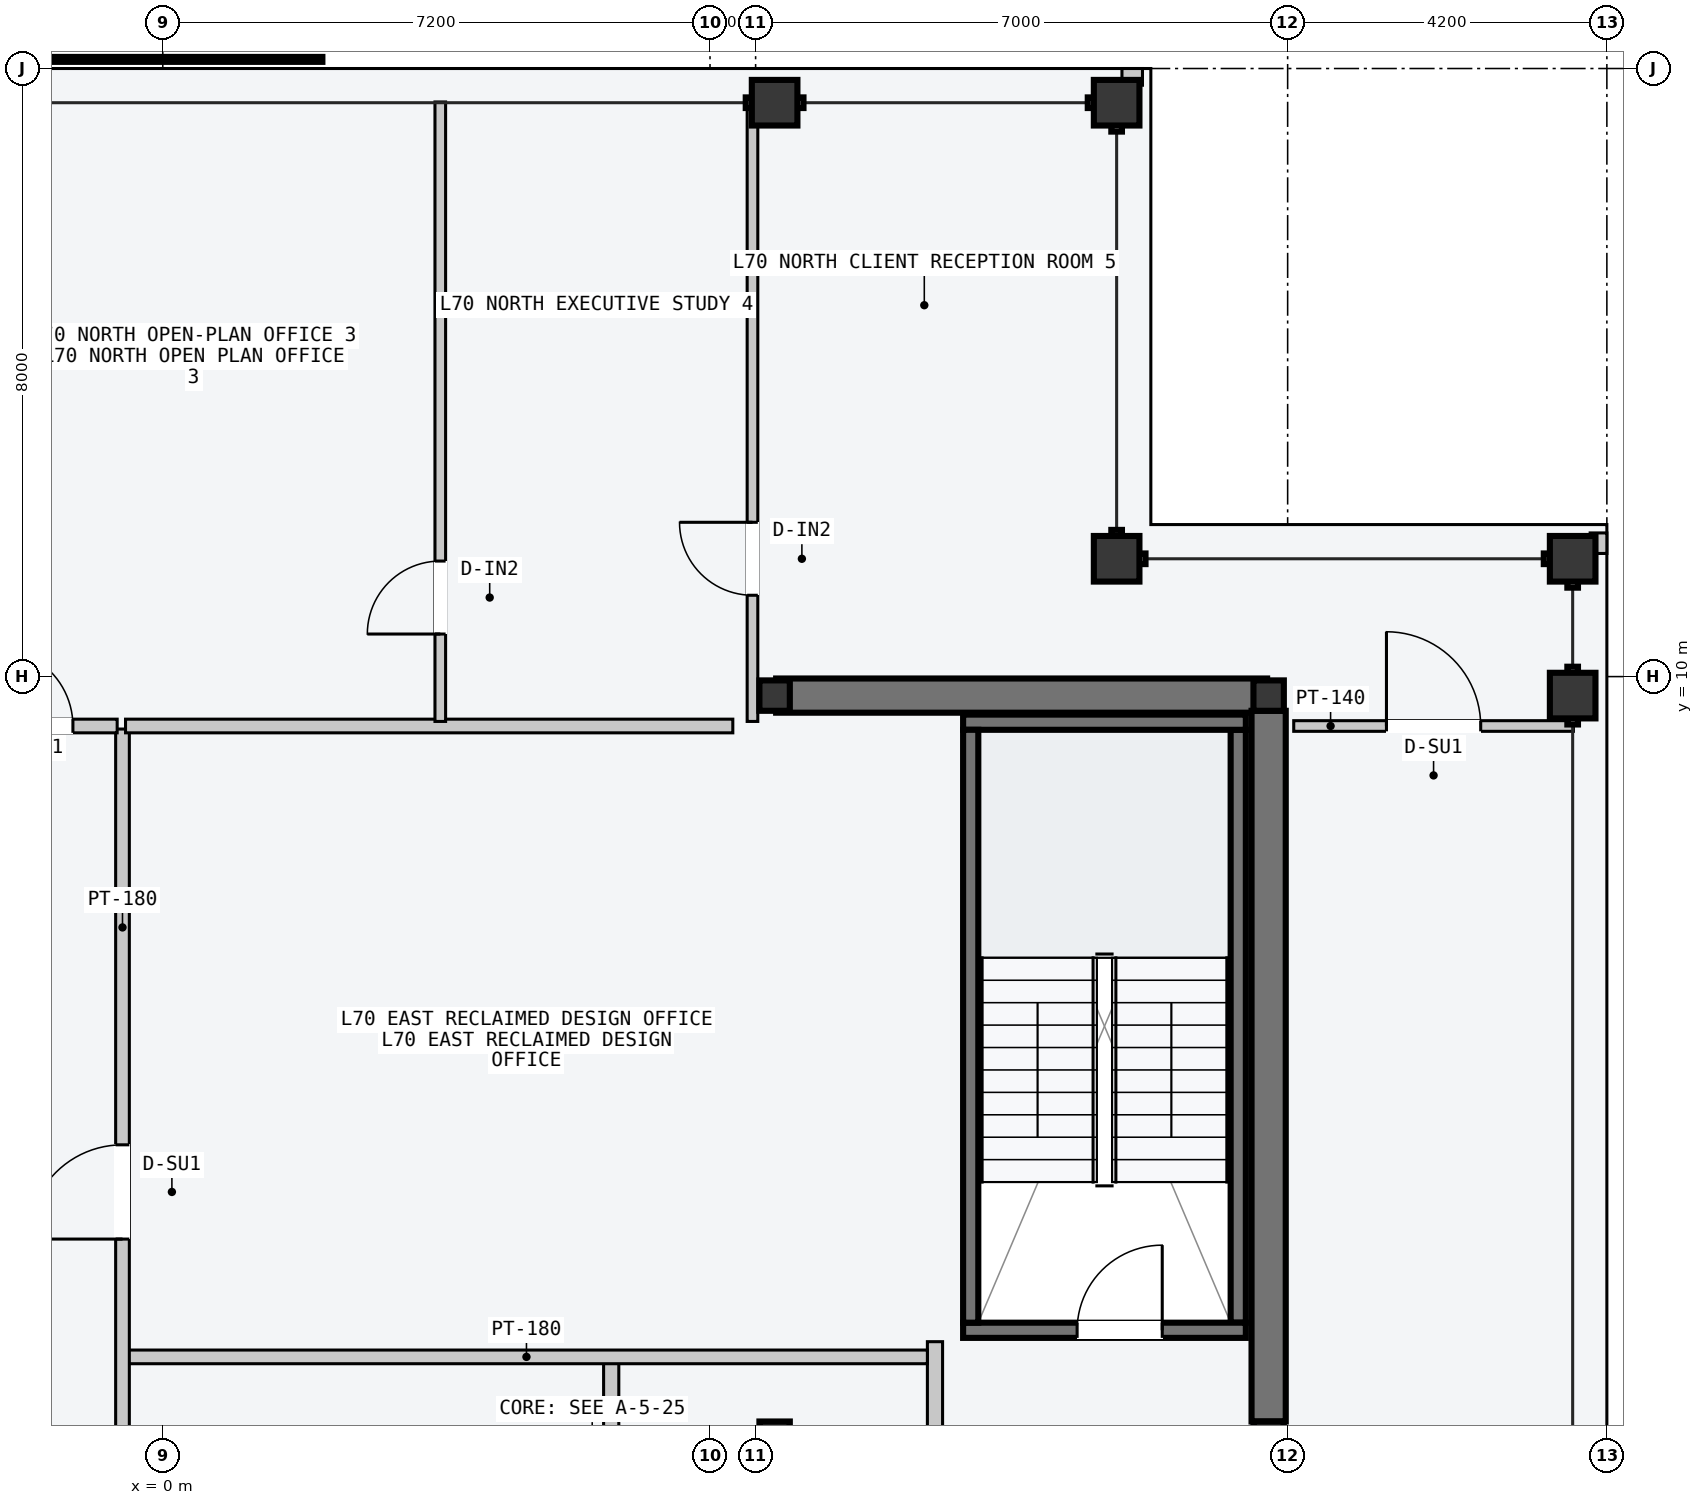
"""IFC4 building model, lengths in metres.
Left out: names, types, materials, properties, quantities, classifications, styles, units other than length and angle.
Written with IfcOpenShell. Run it as: python <this file> out.ifc"""

import sys

from ifc_helpers import new_model, si_unit, direction, frame, frame_2d, origin, origin_2d, place, context, subcontext, project, spatial, rectangle, hollow_rectangle, i_section, extrude, element, fill, save


model = new_model("IFC4")
c1 = context("Model", 3, precision=1e-05, world=origin(), true_north=direction((0.0, 1.0)))
c2 = subcontext(c1, "Body", "Model", "MODEL_VIEW")
j1 = project(units=[si_unit("LENGTHUNIT", "METRE"), si_unit("PLANEANGLEUNIT", "RADIAN")], contexts=[c1])
p1 = place(None, origin())
s1 = spatial("IfcSite", under=j1, at=p1, CompositionType="ELEMENT")
p2 = place(p1, origin())
s2 = spatial("IfcBuilding", under=s1, at=p2, CompositionType="ELEMENT")
p3 = place(p2, frame((0.0, 0.0, 265.2)))
s3 = spatial("IfcBuildingStorey", under=s2, at=p3, CompositionType="ELEMENT", Elevation=265.2)
p4 = place(p3, frame((8.07, 9.75, -0.2), z_axis=(0.0, 0.0, 1.0), x_axis=(1.0, 0.0, 0.0)))
e1 = element("IfcWall", 1, at=p4, inside=s3, PredefinedType="SHEAR", context=c2, shape_type="SweptSolid", body=[
    extrude(rectangle(XDim=6.46, YDim=0.45, at=frame_2d((3.23, 0.0))), origin(), (0.0, 0.0, 1.0), 3.6),
])
p5 = place(p3, frame((14.55, 0.2, -0.2), z_axis=(0.0, 0.0, 1.0), x_axis=(0.0, 1.0, 0.0)))
e2 = element("IfcWall", 2, at=p5, inside=s3, PredefinedType="SHEAR", context=c2, shape_type="SweptSolid", body=[
    extrude(rectangle(XDim=9.35, YDim=0.45, at=frame_2d((4.675, 0.0))), origin(), (0.0, 0.0, 1.0), 3.6),
])
p6 = place(p3, frame((14.15, 1.5, -0.2), z_axis=(0.0, 0.0, 1.0), x_axis=(0.0, 1.0, 0.0)))
e3 = element("IfcWall", 3, at=p6, inside=s3, PredefinedType="SOLIDWALL", context=c2, shape_type="SweptSolid", body=[
    extrude(rectangle(XDim=7.8, YDim=0.2, at=frame_2d((3.9, 0.0))), origin(), (0.0, 0.0, 1.0), 3.6),
])
p7 = place(p3, frame((10.53, 1.4, -0.2), z_axis=(0.0, 0.0, 1.0), x_axis=(1.0, 0.0, 0.0)))
e4 = element("IfcWall", 4, at=p7, inside=s3, PredefinedType="SOLIDWALL", context=c2, shape_type="SweptSolid", body=[
    extrude(rectangle(XDim=3.72, YDim=0.2, at=frame_2d((1.86, 0.0))), origin(), (0.0, 0.0, 1.0), 3.6),
])
p8 = place(p7, frame((1.5, 0.0, 0.2)))
e5 = element("IfcOpeningElement", 5, at=p8, cuts=e4, PredefinedType="OPENING", context=c2, shape_type="SweptSolid", body=[
    extrude(rectangle(XDim=1.12, YDim=2.18, at=frame_2d((0.56, 1.09))), frame((0.0, 0.11, 0.0), z_axis=(0.0, -1.0, 0.0), x_axis=(1.0, 0.0, 0.0)), (0.0, 0.0, 1.0), 0.22),
])
p9 = place(p3, frame((10.53, 9.4, -0.2), z_axis=(0.0, 0.0, 1.0), x_axis=(1.0, 0.0, 0.0)))
e6 = element("IfcWall", 6, at=p9, inside=s3, PredefinedType="SOLIDWALL", context=c2, shape_type="SweptSolid", body=[
    extrude(rectangle(XDim=3.72, YDim=0.2, at=frame_2d((1.86, 0.0))), origin(), (0.0, 0.0, 1.0), 3.6),
])
p10 = place(p3, frame((10.63, 1.5, -0.2), z_axis=(0.0, 0.0, 1.0), x_axis=(0.0, 1.0, 0.0)))
e7 = element("IfcWall", 7, at=p10, inside=s3, PredefinedType="SOLIDWALL", context=c2, shape_type="SweptSolid", body=[
    extrude(rectangle(XDim=7.8, YDim=0.2, at=frame_2d((3.9, 0.0))), origin(), (0.0, 0.0, 1.0), 3.6),
])
for number, where, z_axis, x_axis in (
    (8, (8.05, 0.0, 0.0), (0.0, 0.0, 1.0), (1.0, 0.0, 0.0)),
    (9, (8.05, 9.75, 0.0), (0.0, 0.0, 1.0), (1.0, 0.0, 0.0)),
    (10, (14.55, 0.0, 0.0), (0.0, 0.0, 1.0), (1.0, 0.0, 0.0)),
    (11, (14.55, 9.75, 0.0), (0.0, 0.0, 1.0), (1.0, 0.0, 0.0)),
):
    element("IfcColumn", number, at=place(p3, frame(where, z_axis=z_axis, x_axis=x_axis)), inside=s3, PredefinedType="COLUMN", context=c2, shape_type="SweptSolid", body=[
        extrude(i_section(OverallWidth=0.4, OverallDepth=0.4, WebThickness=0.013, FlangeThickness=0.021, at=origin_2d()), origin(), (0.0, 0.0, 1.0), 3.6),
    ])
for number, where, z_axis, x_axis in (
    (12, (8.05, 17.55, 0.0), (0.0, 0.0, 1.0), (1.0, 0.0, 0.0)),
    (13, (12.55, 17.55, 0.0), (0.0, 0.0, 1.0), (1.0, 0.0, 0.0)),
    (14, (18.55, 9.75, 0.0), (0.0, 0.0, 1.0), (0.0, 1.0, 0.0)),
    (15, (18.55, 11.55, 0.0), (0.0, 0.0, 1.0), (0.0, 1.0, 0.0)),
    (16, (12.55, 11.55, 0.0), (0.0, 0.0, 1.0), (1.0, 0.0, 0.0)),
):
    element("IfcColumn", number, at=place(p3, frame(where, z_axis=z_axis, x_axis=x_axis)), inside=s3, PredefinedType="COLUMN", context=c2, shape_type="SweptSolid", body=[
        extrude(hollow_rectangle(XDim=0.6, YDim=0.6, WallThickness=0.025, at=origin_2d()), origin(), (0.0, 0.0, 1.0), 3.6),
    ])
for number, where, z_axis, x_axis in (
    (17, (12.62, 17.89, 0.0), (0.0, 0.0, 1.0), (1.0, 0.0, 0.0)),
    (18, (18.89, 11.62, 0.0), (0.0, 0.0, 1.0), (0.0, 1.0, 0.0)),
):
    element("IfcWall", number, at=place(p3, frame(where, z_axis=z_axis, x_axis=x_axis)), inside=s3, PredefinedType="PARAPET", context=c2, shape_type="SweptSolid", body=[
        extrude(rectangle(XDim=0.27, YDim=0.22, at=frame_2d((0.135, 0.0))), origin(), (0.0, 0.0, 1.0), 1.2),
    ])
p11 = place(p3, frame((5.9, -9.45, 0.0), z_axis=(0.0, 0.0, 1.0), x_axis=(0.0, 1.0, 0.0)))
e19 = element("IfcWall", 19, at=p11, inside=s3, PredefinedType="PARTITIONING", context=c2, shape_type="SweptSolid", body=[
    extrude(rectangle(XDim=10.5, YDim=0.2, at=frame_2d((5.25, 0.0))), origin(), (0.0, 0.0, 1.0), 3.4),
])
p12 = place(p11, frame((3.9, 0.0, 0.0)))
e20 = element("IfcOpeningElement", 20, at=p12, cuts=e19, PredefinedType="OPENING", context=c2, shape_type="SweptSolid", body=[
    extrude(rectangle(XDim=1.5, YDim=2.2, at=frame_2d((0.75, 1.1))), frame((0.0, 0.11, 0.0), z_axis=(0.0, -1.0, 0.0), x_axis=(1.0, 0.0, 0.0)), (0.0, 0.0, 1.0), 0.22),
])
p13 = place(p3, frame((10.16, -2.55, 0.0), z_axis=(0.0, 0.0, 1.0), x_axis=(0.0, 1.0, 0.0)))
e21 = element("IfcWall", 21, at=p13, inside=s3, PredefinedType="PARTITIONING", context=c2, shape_type="SweptSolid", body=[
    extrude(rectangle(XDim=3.8, YDim=0.2, at=frame_2d((1.9, 0.0))), origin(), (0.0, 0.0, 1.0), 3.4),
])
p14 = place(p13, frame((1.3, 0.0, 0.0)))
e22 = element("IfcOpeningElement", 22, at=p14, cuts=e21, PredefinedType="OPENING", context=c2, shape_type="SweptSolid", body=[
    extrude(rectangle(XDim=1.1, YDim=2.15, at=frame_2d((0.55, 1.075))), frame((0.0, 0.11, 0.0), z_axis=(0.0, -1.0, 0.0), x_axis=(1.0, 0.0, 0.0)), (0.0, 0.0, 1.0), 0.22),
])
p15 = place(p3, frame((-0.49, 1.05, 0.0), z_axis=(0.0, 0.0, 1.0), x_axis=(1.0, 0.0, 0.0)))
e23 = element("IfcWall", 23, at=p15, inside=s3, PredefinedType="PARTITIONING", context=c2, shape_type="SweptSolid", body=[
    extrude(rectangle(XDim=10.55, YDim=0.18, at=frame_2d((5.275, 0.0))), origin(), (0.0, 0.0, 1.0), 3.4),
])
p16 = place(p3, frame((-0.53, -3.5, 0.0), z_axis=(0.0, 0.0, 1.0), x_axis=(0.0, 1.0, 0.0)))
e24 = element("IfcWall", 24, at=p16, inside=s3, PredefinedType="PARTITIONING", context=c2, shape_type="SweptSolid", body=[
    extrude(rectangle(XDim=12.81, YDim=0.18, at=frame_2d((6.405, 0.0))), origin(), (0.0, 0.0, 1.0), 3.4),
])
p17 = place(p16, frame((6.1, 0.0, 0.0)))
e25 = element("IfcOpeningElement", 25, at=p17, cuts=e24, PredefinedType="OPENING", context=c2, shape_type="SweptSolid", body=[
    extrude(rectangle(XDim=1.24, YDim=2.24, at=frame_2d((0.62, 1.12))), frame((0.0, 0.1, 0.0), z_axis=(0.0, -1.0, 0.0), x_axis=(1.0, 0.0, 0.0)), (0.0, 0.0, 1.0), 0.2),
])
p18 = place(p16, frame((1.6, 0.0, 0.0)))
e26 = element("IfcOpeningElement", 26, at=p18, cuts=e24, PredefinedType="OPENING", context=c2, shape_type="SweptSolid", body=[
    extrude(rectangle(XDim=0.96, YDim=2.18, at=frame_2d((0.48, 1.09))), frame((0.0, 0.1, 0.0), z_axis=(0.0, -1.0, 0.0), x_axis=(1.0, 0.0, 0.0)), (0.0, 0.0, 1.0), 0.2),
])
p19 = place(p3, frame((-0.49, 9.35, 0.0), z_axis=(0.0, 0.0, 1.0), x_axis=(1.0, 0.0, 0.0)))
e27 = element("IfcWall", 27, at=p19, inside=s3, PredefinedType="PARTITIONING", context=c2, shape_type="SweptSolid", body=[
    extrude(rectangle(XDim=7.99, YDim=0.18, at=frame_2d((3.995, 0.0))), origin(), (0.0, 0.0, 1.0), 3.4),
])
p20 = place(p3, frame((3.651, 9.41, 0.0), z_axis=(0.0, 0.0, 1.0), x_axis=(0.0, 1.0, 0.0)))
e28 = element("IfcWall", 28, at=p20, inside=s3, PredefinedType="PARTITIONING", context=c2, shape_type="SweptSolid", body=[
    extrude(rectangle(XDim=8.15, YDim=0.14, at=frame_2d((4.075, 0.0))), origin(), (0.0, 0.0, 1.0), 3.4),
])
p21 = place(p20, frame((1.15, 0.0, 0.0)))
e29 = element("IfcOpeningElement", 29, at=p21, cuts=e28, PredefinedType="OPENING", context=c2, shape_type="SweptSolid", body=[
    extrude(rectangle(XDim=0.96, YDim=2.18, at=frame_2d((0.48, 1.09))), frame((0.0, 0.08, 0.0), z_axis=(0.0, -1.0, 0.0), x_axis=(1.0, 0.0, 0.0)), (0.0, 0.0, 1.0), 0.16),
])
p22 = place(p3, frame((7.759, 9.41, 0.0), z_axis=(0.0, 0.0, 1.0), x_axis=(0.0, 1.0, 0.0)))
e30 = element("IfcWall", 30, at=p22, inside=s3, PredefinedType="PARTITIONING", context=c2, shape_type="SweptSolid", body=[
    extrude(rectangle(XDim=8.15, YDim=0.14, at=frame_2d((4.075, 0.0))), origin(), (0.0, 0.0, 1.0), 3.4),
])
p23 = place(p22, frame((1.66, 0.0, 0.0)))
e31 = element("IfcOpeningElement", 31, at=p23, cuts=e30, PredefinedType="OPENING", context=c2, shape_type="SweptSolid", body=[
    extrude(rectangle(XDim=0.96, YDim=2.18, at=frame_2d((0.48, 1.09))), frame((0.0, 0.08, 0.0), z_axis=(0.0, -1.0, 0.0), x_axis=(1.0, 0.0, 0.0)), (0.0, 0.0, 1.0), 0.16),
])
p24 = place(p3, frame((-2.9, 9.35, 0.0), z_axis=(0.0, 0.0, 1.0), x_axis=(1.0, 0.0, 0.0)))
e32 = element("IfcWall", 32, at=p24, inside=s3, PredefinedType="PARTITIONING", context=c2, shape_type="SweptSolid", body=[
    extrude(rectangle(XDim=2.3, YDim=0.18, at=frame_2d((1.15, 0.0))), origin(), (0.0, 0.0, 1.0), 3.4),
])
p25 = place(p24, frame((0.698, 0.0, 0.0)))
e33 = element("IfcOpeningElement", 33, at=p25, cuts=e32, PredefinedType="OPENING", context=c2, shape_type="SweptSolid", body=[
    extrude(rectangle(XDim=1.02, YDim=2.2, at=frame_2d((0.51, 1.1))), frame((0.0, 0.1, 0.0), z_axis=(0.0, -1.0, 0.0), x_axis=(1.0, 0.0, 0.0)), (0.0, 0.0, 1.0), 0.2),
])
p26 = place(p3, frame((14.88, 9.35, 0.0), z_axis=(0.0, 0.0, 1.0), x_axis=(1.0, 0.0, 0.0)))
e34 = element("IfcWall", 34, at=p26, inside=s3, PredefinedType="PARTITIONING", context=c2, shape_type="SweptSolid", body=[
    extrude(rectangle(XDim=3.68, YDim=0.14, at=frame_2d((1.84, 0.0))), origin(), (0.0, 0.0, 1.0), 3.4),
])
p27 = place(p26, frame((1.22, 0.0, 0.0)))
e35 = element("IfcOpeningElement", 35, at=p27, cuts=e34, PredefinedType="OPENING", context=c2, shape_type="SweptSolid", body=[
    extrude(rectangle(XDim=1.24, YDim=2.24, at=frame_2d((0.62, 1.12))), frame((0.0, 0.08, 0.0), z_axis=(0.0, -1.0, 0.0), x_axis=(1.0, 0.0, 0.0)), (0.0, 0.0, 1.0), 0.16),
])
p28 = place(p8, origin())
e36 = element("IfcDoor", 36, at=p28, inside=s3, OperationType="SINGLE_SWING_RIGHT", PredefinedType="DOOR", context=c2, shape_type="SweptSolid", body=[
    extrude(rectangle(XDim=1.12, YDim=2.18, at=frame_2d((0.56, 1.09))), frame((0.0, 0.025, 0.0), z_axis=(0.0, -1.0, 0.0), x_axis=(1.0, 0.0, 0.0)), (0.0, 0.0, 1.0), 0.05),
])
fill(e5, e36)
p29 = place(p17, origin())
e37 = element("IfcDoor", 37, at=p29, inside=s3, OperationType="SINGLE_SWING_LEFT", PredefinedType="DOOR", context=c2, shape_type="SweptSolid", body=[
    extrude(rectangle(XDim=1.24, YDim=2.24, at=frame_2d((0.62, 1.12))), frame((0.0, 0.025, 0.0), z_axis=(0.0, -1.0, 0.0), x_axis=(1.0, 0.0, 0.0)), (0.0, 0.0, 1.0), 0.05),
])
fill(e25, e37)
p30 = place(p21, origin())
e38 = element("IfcDoor", 38, at=p30, inside=s3, OperationType="SINGLE_SWING_LEFT", PredefinedType="DOOR", context=c2, shape_type="SweptSolid", body=[
    extrude(rectangle(XDim=0.96, YDim=2.18, at=frame_2d((0.48, 1.09))), frame((0.0, 0.025, 0.0), z_axis=(0.0, -1.0, 0.0), x_axis=(1.0, 0.0, 0.0)), (0.0, 0.0, 1.0), 0.05),
])
fill(e29, e38)
p31 = place(p23, origin())
e39 = element("IfcDoor", 39, at=p31, inside=s3, OperationType="SINGLE_SWING_RIGHT", PredefinedType="DOOR", context=c2, shape_type="SweptSolid", body=[
    extrude(rectangle(XDim=0.96, YDim=2.18, at=frame_2d((0.48, 1.09))), frame((0.0, 0.025, 0.0), z_axis=(0.0, -1.0, 0.0), x_axis=(1.0, 0.0, 0.0)), (0.0, 0.0, 1.0), 0.05),
])
fill(e31, e39)
p32 = place(p25, origin())
e40 = element("IfcDoor", 40, at=p32, inside=s3, OperationType="SINGLE_SWING_LEFT", PredefinedType="DOOR", context=c2, shape_type="SweptSolid", body=[
    extrude(rectangle(XDim=1.02, YDim=2.2, at=frame_2d((0.51, 1.1))), frame((0.0, 0.025, 0.0), z_axis=(0.0, -1.0, 0.0), x_axis=(1.0, 0.0, 0.0)), (0.0, 0.0, 1.0), 0.05),
])
fill(e33, e40)
p33 = place(p27, origin())
e41 = element("IfcDoor", 41, at=p33, inside=s3, OperationType="SINGLE_SWING_LEFT", PredefinedType="DOOR", context=c2, shape_type="SweptSolid", body=[
    extrude(rectangle(XDim=1.24, YDim=2.24, at=frame_2d((0.62, 1.12))), frame((0.0, 0.025, 0.0), z_axis=(0.0, -1.0, 0.0), x_axis=(1.0, 0.0, 0.0)), (0.0, 0.0, 1.0), 0.05),
])
fill(e35, e41)
save(model, sys.argv[1])
